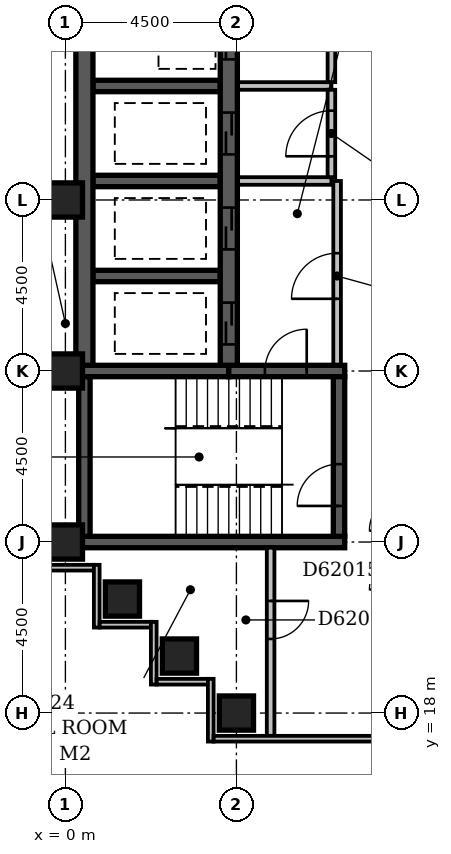
"""IFC4 building model, lengths in metres.
Left out: names, types, materials, properties, quantities, classifications, styles, units other than length and angle.
Written with IfcOpenShell. Run it as: python <this file> out.ifc"""

import sys

from ifc_helpers import new_model, si_unit, direction, frame, frame_2d, origin, origin_2d, place, context, subcontext, project, spatial, rectangle, extrude, element, fill, save


model = new_model("IFC4")
c1 = context("Model", 3, precision=1e-05, world=origin(), true_north=direction((0.0, 1.0)))
c2 = subcontext(c1, "Body", "Model", "MODEL_VIEW")
j1 = project(units=[si_unit("LENGTHUNIT", "METRE"), si_unit("PLANEANGLEUNIT", "RADIAN")], contexts=[c1])
p1 = place(None, origin())
s1 = spatial("IfcSite", under=j1, at=p1, CompositionType="ELEMENT")
p2 = place(p1, origin())
s2 = spatial("IfcBuilding", under=s1, at=p2, CompositionType="ELEMENT")
p3 = place(p2, frame((0.0, 0.0, 240.2)))
s3 = spatial("IfcBuildingStorey", under=s2, at=p3, CompositionType="ELEMENT", Elevation=240.2)
p4 = place(p3, frame((0.35, 22.5, -0.3), z_axis=(0.0, 0.0, 1.0), x_axis=(1.0, 0.0, 0.0)))
e1 = element("IfcWall", 1, at=p4, inside=s3, PredefinedType="SHEAR", context=c2, shape_type="SweptSolid", body=[
    extrude(rectangle(XDim=7.0, YDim=0.3, at=frame_2d((3.5, 0.0))), origin(), (0.0, 0.0, 1.0), 3.6),
])
p5 = place(p3, frame((0.35, 27.0, -0.3), z_axis=(0.0, 0.0, 1.0), x_axis=(1.0, 0.0, 0.0)))
e2 = element("IfcWall", 2, at=p5, inside=s3, PredefinedType="SHEAR", context=c2, shape_type="SweptSolid", body=[
    extrude(rectangle(XDim=3.95, YDim=0.3, at=frame_2d((1.975, 0.0))), origin(), (0.0, 0.0, 1.0), 3.6),
])
p6 = place(p3, frame((0.5, 22.65, -0.3), z_axis=(0.0, 0.0, 1.0), x_axis=(0.0, 1.0, 0.0)))
e3 = element("IfcWall", 3, at=p6, inside=s3, PredefinedType="SHEAR", context=c2, shape_type="SweptSolid", body=[
    extrude(rectangle(XDim=4.2, YDim=0.3, at=frame_2d((2.1, 0.0))), origin(), (0.0, 0.0, 1.0), 3.6),
])
p7 = place(p3, frame((0.5, 27.15, -0.3), z_axis=(0.0, 0.0, 1.0), x_axis=(0.0, 1.0, 0.0)))
e4 = element("IfcWall", 4, at=p7, inside=s3, PredefinedType="SHEAR", context=c2, shape_type="SweptSolid", body=[
    extrude(rectangle(XDim=22.125, YDim=0.45, at=frame_2d((11.062, 0.0))), origin(), (0.0, 0.0, 1.0), 3.6),
])
for number, where, z_axis, x_axis in (
    (5, (0.725, 29.5, -0.3), (0.0, 0.0, 1.0), (1.0, 0.0, 0.0)),
    (6, (0.725, 32.0, -0.3), (0.0, 0.0, 1.0), (1.0, 0.0, 0.0)),
    (7, (0.725, 34.5, -0.3), (0.0, 0.0, 1.0), (1.0, 0.0, 0.0)),
):
    element("IfcWall", number, at=place(p3, frame(where, z_axis=z_axis, x_axis=x_axis)), inside=s3, PredefinedType="SHEAR", context=c2, shape_type="SweptSolid", body=[
        extrude(rectangle(XDim=3.35, YDim=0.3, at=frame_2d((1.675, 0.0))), origin(), (0.0, 0.0, 1.0), 3.6),
    ])
p8 = place(p3, frame((4.3, 27.0, -0.3), z_axis=(0.0, 0.0, 1.0), x_axis=(1.0, 0.0, 0.0)))
e8 = element("IfcWall", 8, at=p8, inside=s3, PredefinedType="SHEAR", context=c2, shape_type="SweptSolid", body=[
    extrude(rectangle(XDim=3.05, YDim=0.3, at=frame_2d((1.525, 0.0))), origin(), (0.0, 0.0, 1.0), 3.6),
])
p9 = place(p8, frame((0.95, 0.0, 0.3)))
e9 = element("IfcOpeningElement", 9, at=p9, cuts=e8, PredefinedType="OPENING", context=c2, shape_type="SweptSolid", body=[
    extrude(rectangle(XDim=1.1, YDim=2.1, at=frame_2d((0.55, 1.05))), frame((0.0, 0.162, 0.0), z_axis=(0.0, -1.0, 0.0), x_axis=(1.0, 0.0, 0.0)), (0.0, 0.0, 1.0), 0.324),
])
p10 = place(p3, frame((4.3, 27.15, -0.3), z_axis=(0.0, 0.0, 1.0), x_axis=(0.0, 1.0, 0.0)))
e10 = element("IfcWall", 10, at=p10, inside=s3, PredefinedType="SHEAR", context=c2, shape_type="SweptSolid", body=[
    extrude(rectangle(XDim=22.125, YDim=0.45, at=frame_2d((11.062, 0.0))), origin(), (0.0, 0.0, 1.0), 3.6),
])
p11 = place(p10, frame((3.05, 0.0, 0.3)))
e11 = element("IfcOpeningElement", 11, at=p11, cuts=e10, PredefinedType="OPENING", context=c2, shape_type="SweptSolid", body=[
    extrude(rectangle(XDim=1.1, YDim=2.1, at=frame_2d((0.55, 1.05))), frame((0.0, 0.237, 0.0), z_axis=(0.0, -1.0, 0.0), x_axis=(1.0, 0.0, 0.0)), (0.0, 0.0, 1.0), 0.474),
])
p12 = place(p10, frame((0.55, 0.0, 0.3)))
e12 = element("IfcOpeningElement", 12, at=p12, cuts=e10, PredefinedType="OPENING", context=c2, shape_type="SweptSolid", body=[
    extrude(rectangle(XDim=1.1, YDim=2.1, at=frame_2d((0.55, 1.05))), frame((0.0, 0.237, 0.0), z_axis=(0.0, -1.0, 0.0), x_axis=(1.0, 0.0, 0.0)), (0.0, 0.0, 1.0), 0.474),
])
p13 = place(p10, frame((20.55, 0.0, 0.3)))
e13 = element("IfcOpeningElement", 13, at=p13, cuts=e10, PredefinedType="OPENING", context=c2, shape_type="SweptSolid", body=[
    extrude(rectangle(XDim=1.1, YDim=2.1, at=frame_2d((0.55, 1.05))), frame((0.0, 0.237, 0.0), z_axis=(0.0, -1.0, 0.0), x_axis=(1.0, 0.0, 0.0)), (0.0, 0.0, 1.0), 0.474),
])
p14 = place(p10, frame((18.05, 0.0, 0.3)))
e14 = element("IfcOpeningElement", 14, at=p14, cuts=e10, PredefinedType="OPENING", context=c2, shape_type="SweptSolid", body=[
    extrude(rectangle(XDim=1.1, YDim=2.1, at=frame_2d((0.55, 1.05))), frame((0.0, 0.237, 0.0), z_axis=(0.0, -1.0, 0.0), x_axis=(1.0, 0.0, 0.0)), (0.0, 0.0, 1.0), 0.474),
])
p15 = place(p10, frame((15.55, 0.0, 0.3)))
e15 = element("IfcOpeningElement", 15, at=p15, cuts=e10, PredefinedType="OPENING", context=c2, shape_type="SweptSolid", body=[
    extrude(rectangle(XDim=1.1, YDim=2.1, at=frame_2d((0.55, 1.05))), frame((0.0, 0.237, 0.0), z_axis=(0.0, -1.0, 0.0), x_axis=(1.0, 0.0, 0.0)), (0.0, 0.0, 1.0), 0.474),
])
p16 = place(p10, frame((13.05, 0.0, 0.3)))
e16 = element("IfcOpeningElement", 16, at=p16, cuts=e10, PredefinedType="OPENING", context=c2, shape_type="SweptSolid", body=[
    extrude(rectangle(XDim=1.1, YDim=2.1, at=frame_2d((0.55, 1.05))), frame((0.0, 0.237, 0.0), z_axis=(0.0, -1.0, 0.0), x_axis=(1.0, 0.0, 0.0)), (0.0, 0.0, 1.0), 0.474),
])
p17 = place(p10, frame((10.55, 0.0, 0.3)))
e17 = element("IfcOpeningElement", 17, at=p17, cuts=e10, PredefinedType="OPENING", context=c2, shape_type="SweptSolid", body=[
    extrude(rectangle(XDim=1.1, YDim=2.1, at=frame_2d((0.55, 1.05))), frame((0.0, 0.237, 0.0), z_axis=(0.0, -1.0, 0.0), x_axis=(1.0, 0.0, 0.0)), (0.0, 0.0, 1.0), 0.474),
])
p18 = place(p10, frame((8.05, 0.0, 0.3)))
e18 = element("IfcOpeningElement", 18, at=p18, cuts=e10, PredefinedType="OPENING", context=c2, shape_type="SweptSolid", body=[
    extrude(rectangle(XDim=1.1, YDim=2.1, at=frame_2d((0.55, 1.05))), frame((0.0, 0.237, 0.0), z_axis=(0.0, -1.0, 0.0), x_axis=(1.0, 0.0, 0.0)), (0.0, 0.0, 1.0), 0.474),
])
p19 = place(p10, frame((5.55, 0.0, 0.3)))
e19 = element("IfcOpeningElement", 19, at=p19, cuts=e10, PredefinedType="OPENING", context=c2, shape_type="SweptSolid", body=[
    extrude(rectangle(XDim=1.1, YDim=2.1, at=frame_2d((0.55, 1.05))), frame((0.0, 0.237, 0.0), z_axis=(0.0, -1.0, 0.0), x_axis=(1.0, 0.0, 0.0)), (0.0, 0.0, 1.0), 0.474),
])
p20 = place(p3, frame((7.2, 22.65, -0.3), z_axis=(0.0, 0.0, 1.0), x_axis=(0.0, 1.0, 0.0)))
e20 = element("IfcWall", 20, at=p20, inside=s3, PredefinedType="SHEAR", context=c2, shape_type="SweptSolid", body=[
    extrude(rectangle(XDim=4.2, YDim=0.3, at=frame_2d((2.1, 0.0))), origin(), (0.0, 0.0, 1.0), 3.6),
])
p21 = place(p20, frame((0.8, 0.0, 0.3)))
e21 = element("IfcOpeningElement", 21, at=p21, cuts=e20, PredefinedType="OPENING", context=c2, shape_type="SweptSolid", body=[
    extrude(rectangle(XDim=1.1, YDim=2.1, at=frame_2d((0.55, 1.05))), frame((0.0, 0.162, 0.0), z_axis=(0.0, -1.0, 0.0), x_axis=(1.0, 0.0, 0.0)), (0.0, 0.0, 1.0), 0.324),
])
for number, where, z_axis, x_axis in (
    (22, (4.5, 18.0, -0.3), (0.0, 0.0, 1.0), (1.0, 0.0, 0.0)),
    (23, (3.0, 19.5, -0.3), (0.0, 0.0, 1.0), (1.0, 0.0, 0.0)),
    (24, (1.5, 21.0, -0.3), (0.0, 0.0, 1.0), (1.0, 0.0, 0.0)),
    (25, (0.0, 22.5, -0.3), (0.0, 0.0, 1.0), (1.0, 0.0, 0.0)),
    (26, (0.0, 27.0, -0.3), (0.0, 0.0, 1.0), (1.0, 0.0, 0.0)),
    (27, (0.0, 31.5, -0.3), (0.0, 0.0, 1.0), (1.0, 0.0, 0.0)),
):
    element("IfcColumn", number, at=place(p3, frame(where, z_axis=z_axis, x_axis=x_axis)), inside=s3, PredefinedType="COLUMN", context=c2, shape_type="SweptSolid", body=[
        extrude(rectangle(XDim=0.9, YDim=0.9, at=origin_2d()), origin(), (0.0, 0.0, 1.0), 3.6),
    ])
p22 = place(p3, frame((-0.6, 21.825, 0.0), z_axis=(0.0, 0.0, 1.0), x_axis=(1.0, 0.0, 0.0)))
e28 = element("IfcWall", 28, at=p22, inside=s3, PredefinedType="STANDARD", context=c2, shape_type="SweptSolid", body=[
    extrude(rectangle(XDim=1.35, YDim=0.15, at=frame_2d((0.675, 0.0))), origin(), (0.0, 0.0, 1.0), 2.7),
])
p23 = place(p3, frame((0.825, 21.9, 0.0), z_axis=(0.0, 0.0, 1.0), x_axis=(0.0, -1.0, 0.0)))
e29 = element("IfcWall", 29, at=p23, inside=s3, PredefinedType="STANDARD", context=c2, shape_type="SweptSolid", body=[
    extrude(rectangle(XDim=1.65, YDim=0.15, at=frame_2d((0.825, 0.0))), origin(), (0.0, 0.0, 1.0), 2.7),
])
p24 = place(p3, frame((0.9, 20.325, 0.0), z_axis=(0.0, 0.0, 1.0), x_axis=(1.0, 0.0, 0.0)))
e30 = element("IfcWall", 30, at=p24, inside=s3, PredefinedType="STANDARD", context=c2, shape_type="SweptSolid", body=[
    extrude(rectangle(XDim=1.35, YDim=0.15, at=frame_2d((0.675, 0.0))), origin(), (0.0, 0.0, 1.0), 2.7),
])
p25 = place(p3, frame((2.325, 20.4, 0.0), z_axis=(0.0, 0.0, 1.0), x_axis=(0.0, -1.0, 0.0)))
e31 = element("IfcWall", 31, at=p25, inside=s3, PredefinedType="STANDARD", context=c2, shape_type="SweptSolid", body=[
    extrude(rectangle(XDim=1.65, YDim=0.15, at=frame_2d((0.825, 0.0))), origin(), (0.0, 0.0, 1.0), 2.7),
])
p26 = place(p3, frame((2.4, 18.825, 0.0), z_axis=(0.0, 0.0, 1.0), x_axis=(1.0, 0.0, 0.0)))
e32 = element("IfcWall", 32, at=p26, inside=s3, PredefinedType="STANDARD", context=c2, shape_type="SweptSolid", body=[
    extrude(rectangle(XDim=1.35, YDim=0.15, at=frame_2d((0.675, 0.0))), origin(), (0.0, 0.0, 1.0), 2.7),
])
p27 = place(p3, frame((3.825, 18.9, 0.0), z_axis=(0.0, 0.0, 1.0), x_axis=(0.0, -1.0, 0.0)))
e33 = element("IfcWall", 33, at=p27, inside=s3, PredefinedType="STANDARD", context=c2, shape_type="SweptSolid", body=[
    extrude(rectangle(XDim=1.65, YDim=0.15, at=frame_2d((0.825, 0.0))), origin(), (0.0, 0.0, 1.0), 2.7),
])
p28 = place(p3, frame((3.9, 17.325, 0.0), z_axis=(0.0, 0.0, 1.0), x_axis=(1.0, 0.0, 0.0)))
e34 = element("IfcWall", 34, at=p28, inside=s3, PredefinedType="STANDARD", context=c2, shape_type="SweptSolid", body=[
    extrude(rectangle(XDim=19.35, YDim=0.15, at=frame_2d((9.675, 0.0))), origin(), (0.0, 0.0, 1.0), 2.7),
])
p29 = place(p28, frame((12.938, 0.0, 0.6)))
e35 = element("IfcOpeningElement", 35, at=p29, cuts=e34, PredefinedType="OPENING", context=c2, shape_type="SweptSolid", body=[
    extrude(rectangle(XDim=0.45, YDim=1.8, at=frame_2d((0.225, 0.9))), frame((0.0, 0.087, 0.0), z_axis=(0.0, -1.0, 0.0), x_axis=(1.0, 0.0, 0.0)), (0.0, 0.0, 1.0), 0.174),
])
p30 = place(p28, frame((15.15, 0.0, 0.6)))
e36 = element("IfcOpeningElement", 36, at=p30, cuts=e34, PredefinedType="OPENING", context=c2, shape_type="SweptSolid", body=[
    extrude(rectangle(XDim=2.4, YDim=1.8, at=frame_2d((1.2, 0.9))), frame((0.0, 0.087, 0.0), z_axis=(0.0, -1.0, 0.0), x_axis=(1.0, 0.0, 0.0)), (0.0, 0.0, 1.0), 0.174),
])
p31 = place(p3, frame((4.545, 34.5, 0.0), z_axis=(0.0, 0.0, 1.0), x_axis=(1.0, 0.0, 0.0)))
e37 = element("IfcWall", 37, at=p31, inside=s3, PredefinedType="PARTITIONING", context=c2, shape_type="SweptSolid", body=[
    extrude(rectangle(XDim=2.455, YDim=0.2, at=frame_2d((1.228, 0.0))), origin(), (0.0, 0.0, 1.0), 3.3),
])
p32 = place(p3, frame((7.0, 34.6, 0.0), z_axis=(0.0, 0.0, 1.0), x_axis=(0.0, 1.0, 0.0)))
e38 = element("IfcWall", 38, at=p32, inside=s3, PredefinedType="PARTITIONING", context=c2, shape_type="SweptSolid", body=[
    extrude(rectangle(XDim=14.9, YDim=0.2, at=frame_2d((7.45, 0.0))), origin(), (0.0, 0.0, 1.0), 3.3),
])
p33 = place(p32, frame((2.8, 0.0, 0.0)))
e39 = element("IfcOpeningElement", 39, at=p33, cuts=e38, PredefinedType="OPENING", context=c2, shape_type="SweptSolid", body=[
    extrude(rectangle(XDim=1.2, YDim=2.1, at=frame_2d((0.6, 1.05))), frame((0.0, 0.112, 0.0), z_axis=(0.0, -1.0, 0.0), x_axis=(1.0, 0.0, 0.0)), (0.0, 0.0, 1.0), 0.224),
])
p34 = place(p32, frame((9.8, 0.0, 0.0)))
e40 = element("IfcOpeningElement", 40, at=p34, cuts=e38, PredefinedType="OPENING", context=c2, shape_type="SweptSolid", body=[
    extrude(rectangle(XDim=1.2, YDim=2.1, at=frame_2d((0.6, 1.05))), frame((0.0, 0.112, 0.0), z_axis=(0.0, -1.0, 0.0), x_axis=(1.0, 0.0, 0.0)), (0.0, 0.0, 1.0), 0.224),
])
p35 = place(p3, frame((4.545, 32.0, 0.0), z_axis=(0.0, 0.0, 1.0), x_axis=(1.0, 0.0, 0.0)))
e41 = element("IfcWall", 41, at=p35, inside=s3, PredefinedType="PARTITIONING", context=c2, shape_type="SweptSolid", body=[
    extrude(rectangle(XDim=2.455, YDim=0.2, at=frame_2d((1.228, 0.0))), origin(), (0.0, 0.0, 1.0), 3.3),
])
p36 = place(p3, frame((7.0, 32.1, 0.0), z_axis=(0.0, 0.0, 1.0), x_axis=(0.0, 1.0, 0.0)))
e42 = element("IfcWall", 42, at=p36, inside=s3, PredefinedType="PARTITIONING", context=c2, shape_type="SweptSolid", body=[
    extrude(rectangle(XDim=2.3, YDim=0.2, at=frame_2d((1.15, 0.0))), origin(), (0.0, 0.0, 1.0), 3.3),
])
p37 = place(p36, frame((0.55, 0.0, 0.0)))
e43 = element("IfcOpeningElement", 43, at=p37, cuts=e42, PredefinedType="OPENING", context=c2, shape_type="SweptSolid", body=[
    extrude(rectangle(XDim=1.2, YDim=2.1, at=frame_2d((0.6, 1.05))), frame((0.0, 0.112, 0.0), z_axis=(0.0, -1.0, 0.0), x_axis=(1.0, 0.0, 0.0)), (0.0, 0.0, 1.0), 0.224),
])
p38 = place(p3, frame((7.15, 27.17, 0.0), z_axis=(0.0, 0.0, 1.0), x_axis=(0.0, 1.0, 0.0)))
e44 = element("IfcWall", 44, at=p38, inside=s3, PredefinedType="PARTITIONING", context=c2, shape_type="SweptSolid", body=[
    extrude(rectangle(XDim=4.83, YDim=0.2, at=frame_2d((2.415, 0.0))), origin(), (0.0, 0.0, 1.0), 3.3),
])
p39 = place(p38, frame((1.73, 0.0, 0.0)))
e45 = element("IfcOpeningElement", 45, at=p39, cuts=e44, PredefinedType="OPENING", context=c2, shape_type="SweptSolid", body=[
    extrude(rectangle(XDim=1.2, YDim=2.1, at=frame_2d((0.6, 1.05))), frame((0.0, 0.112, 0.0), z_axis=(0.0, -1.0, 0.0), x_axis=(1.0, 0.0, 0.0)), (0.0, 0.0, 1.0), 0.224),
])
p40 = place(p3, frame((5.4, 17.4, 0.0), z_axis=(0.0, 0.0, 1.0), x_axis=(0.0, 1.0, 0.0)))
e46 = element("IfcWall", 46, at=p40, inside=s3, PredefinedType="PARTITIONING", context=c2, shape_type="SweptSolid", body=[
    extrude(rectangle(XDim=4.95, YDim=0.2, at=frame_2d((2.475, 0.0))), origin(), (0.0, 0.0, 1.0), 3.3),
])
p41 = place(p40, frame((2.55, 0.0, 0.0)))
e47 = element("IfcOpeningElement", 47, at=p41, cuts=e46, PredefinedType="OPENING", context=c2, shape_type="SweptSolid", body=[
    extrude(rectangle(XDim=1.0, YDim=2.1, at=frame_2d((0.5, 1.05))), frame((0.0, 0.112, 0.0), z_axis=(0.0, -1.0, 0.0), x_axis=(1.0, 0.0, 0.0)), (0.0, 0.0, 1.0), 0.224),
])
p42 = place(p39, origin())
e48 = element("IfcDoor", 48, at=p42, inside=s3, OperationType="SINGLE_SWING_LEFT", PredefinedType="DOOR", context=c2, shape_type="SweptSolid", body=[
    extrude(rectangle(XDim=1.2, YDim=2.1, at=frame_2d((0.6, 1.05))), frame((0.0, 0.025, 0.0), z_axis=(0.0, -1.0, 0.0), x_axis=(1.0, 0.0, 0.0)), (0.0, 0.0, 1.0), 0.05),
])
fill(e45, e48)
p43 = place(p11, origin())
e49 = element("IfcDoor", 49, at=p43, inside=s3, OperationType="SLIDING_TO_LEFT", PredefinedType="DOOR", context=c2, shape_type="SweptSolid", body=[
    extrude(rectangle(XDim=1.1, YDim=2.1, at=frame_2d((0.55, 1.05))), frame((0.0, 0.025, 0.0), z_axis=(0.0, -1.0, 0.0), x_axis=(1.0, 0.0, 0.0)), (0.0, 0.0, 1.0), 0.05),
])
fill(e11, e49)
p44 = place(p12, origin())
e50 = element("IfcDoor", 50, at=p44, inside=s3, OperationType="SLIDING_TO_LEFT", PredefinedType="DOOR", context=c2, shape_type="SweptSolid", body=[
    extrude(rectangle(XDim=1.1, YDim=2.1, at=frame_2d((0.55, 1.05))), frame((0.0, 0.025, 0.0), z_axis=(0.0, -1.0, 0.0), x_axis=(1.0, 0.0, 0.0)), (0.0, 0.0, 1.0), 0.05),
])
fill(e12, e50)
p45 = place(p18, origin())
e51 = element("IfcDoor", 51, at=p45, inside=s3, OperationType="SLIDING_TO_LEFT", PredefinedType="DOOR", context=c2, shape_type="SweptSolid", body=[
    extrude(rectangle(XDim=1.1, YDim=2.1, at=frame_2d((0.55, 1.05))), frame((0.0, 0.025, 0.0), z_axis=(0.0, -1.0, 0.0), x_axis=(1.0, 0.0, 0.0)), (0.0, 0.0, 1.0), 0.05),
])
fill(e18, e51)
p46 = place(p37, origin())
e52 = element("IfcDoor", 52, at=p46, inside=s3, OperationType="SINGLE_SWING_LEFT", PredefinedType="DOOR", context=c2, shape_type="SweptSolid", body=[
    extrude(rectangle(XDim=1.2, YDim=2.1, at=frame_2d((0.6, 1.05))), frame((0.0, 0.025, 0.0), z_axis=(0.0, -1.0, 0.0), x_axis=(1.0, 0.0, 0.0)), (0.0, 0.0, 1.0), 0.05),
])
fill(e43, e52)
p47 = place(p19, origin())
e53 = element("IfcDoor", 53, at=p47, inside=s3, OperationType="SLIDING_TO_LEFT", PredefinedType="DOOR", context=c2, shape_type="SweptSolid", body=[
    extrude(rectangle(XDim=1.1, YDim=2.1, at=frame_2d((0.55, 1.05))), frame((0.0, 0.025, 0.0), z_axis=(0.0, -1.0, 0.0), x_axis=(1.0, 0.0, 0.0)), (0.0, 0.0, 1.0), 0.05),
])
fill(e19, e53)
p48 = place(p9, frame((1.1, 0.0, 0.0), z_axis=(0.0, 0.0, 1.0), x_axis=(-1.0, 0.0, 0.0)))
e54 = element("IfcDoor", 54, at=p48, inside=s3, OperationType="SINGLE_SWING_LEFT", PredefinedType="DOOR", context=c2, shape_type="SweptSolid", body=[
    extrude(rectangle(XDim=1.1, YDim=2.1, at=frame_2d((0.55, 1.05))), frame((0.0, 0.025, 0.0), z_axis=(0.0, -1.0, 0.0), x_axis=(1.0, 0.0, 0.0)), (0.0, 0.0, 1.0), 0.05),
])
fill(e9, e54)
p49 = place(p21, origin())
e55 = element("IfcDoor", 55, at=p49, inside=s3, OperationType="SINGLE_SWING_LEFT", PredefinedType="DOOR", context=c2, shape_type="SweptSolid", body=[
    extrude(rectangle(XDim=1.1, YDim=2.1, at=frame_2d((0.55, 1.05))), frame((0.0, 0.025, 0.0), z_axis=(0.0, -1.0, 0.0), x_axis=(1.0, 0.0, 0.0)), (0.0, 0.0, 1.0), 0.05),
])
fill(e21, e55)
p50 = place(p41, origin())
e56 = element("IfcDoor", 56, at=p50, inside=s3, OperationType="SINGLE_SWING_RIGHT", PredefinedType="DOOR", context=c2, shape_type="SweptSolid", body=[
    extrude(rectangle(XDim=1.0, YDim=2.1, at=frame_2d((0.5, 1.05))), frame((0.0, 0.025, 0.0), z_axis=(0.0, -1.0, 0.0), x_axis=(1.0, 0.0, 0.0)), (0.0, 0.0, 1.0), 0.05),
])
fill(e47, e56)
save(model, sys.argv[1])
